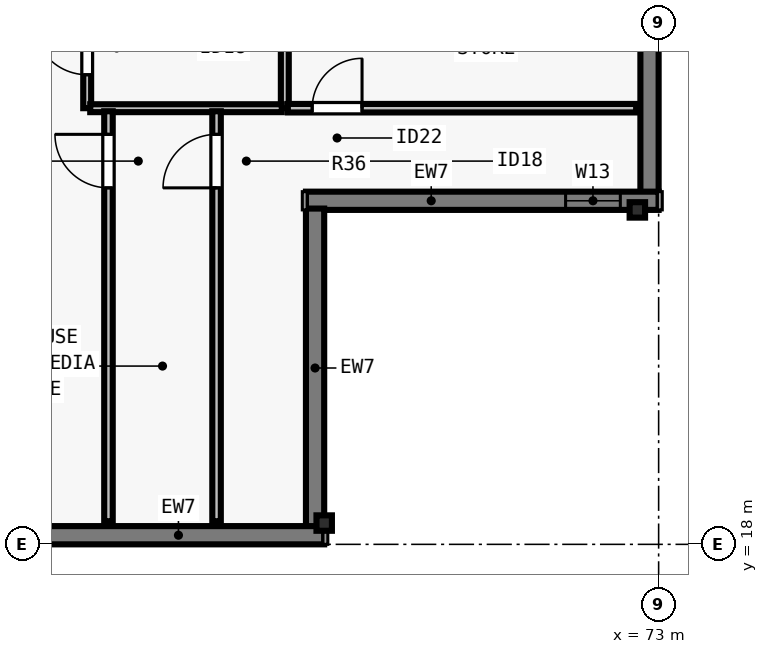
"""IFC4 building model, lengths in metres.
Left out: names, types, materials, properties, quantities, classifications, styles, units other than length and angle.
Written with IfcOpenShell. Run it as: python <this file> out.ifc"""

import sys

from ifc_helpers import new_model, si_unit, direction, frame, frame_2d, origin, origin_2d, place, context, subcontext, project, spatial, rectangle, i_section, extrude, element, fill, save


model = new_model("IFC4")
c1 = context("Model", 3, precision=1e-05, world=origin(), true_north=direction((0.0, 1.0)))
c2 = subcontext(c1, "Body", "Model", "MODEL_VIEW")
j1 = project(units=[si_unit("LENGTHUNIT", "METRE"), si_unit("PLANEANGLEUNIT", "RADIAN")], contexts=[c1])
p1 = place(None, origin())
s1 = spatial("IfcSite", under=j1, at=p1, CompositionType="ELEMENT")
p2 = place(p1, origin())
s2 = spatial("IfcBuilding", under=s1, at=p2, CompositionType="ELEMENT")
p3 = place(p2, frame((0.0, 0.0, 312.0)))
s3 = spatial("IfcBuildingStorey", under=s2, at=p3, CompositionType="ELEMENT", Elevation=312.0)
for number, where, z_axis, x_axis in (
    (1, (67.5, 18.35, 0.0), (0.0, 0.0, 1.0), (1.0, 0.0, 0.0)),
    (2, (72.65, 23.5, 0.0), (0.0, 0.0, 1.0), (0.0, 1.0, 0.0)),
):
    element("IfcColumn", number, at=place(p3, frame(where, z_axis=z_axis, x_axis=x_axis)), inside=s3, PredefinedType="COLUMN", context=c2, shape_type="SweptSolid", body=[
        extrude(i_section(OverallWidth=0.254, OverallDepth=0.254, WebThickness=0.009, FlangeThickness=0.014, FilletRadius=0.013, at=origin_2d()), origin(), (0.0, 0.0, 1.0), 3.5),
    ])
p4 = place(p3, frame((72.85, 44.4, 0.0), z_axis=(0.0, 0.0, 1.0), x_axis=(0.0, -1.0, 0.0)))
e3 = element("IfcWall", 3, at=p4, inside=s3, PredefinedType="SOLIDWALL", context=c2, shape_type="SweptSolid", body=[
    extrude(rectangle(XDim=20.622, YDim=0.3, at=frame_2d((10.311, 0.0))), origin(), (0.0, 0.0, 1.0), 3.29),
])
p5 = place(p4, frame((2.815, 0.0, 0.8)))
e4 = element("IfcOpeningElement", 4, at=p5, cuts=e3, PredefinedType="OPENING", context=c2, shape_type="SweptSolid", body=[
    extrude(rectangle(XDim=1.65, YDim=1.758, at=frame_2d((0.825, 0.879))), frame((0.0, 0.16, 0.0), z_axis=(0.0, -1.0, 0.0), x_axis=(1.0, 0.0, 0.0)), (0.0, 0.0, 1.0), 0.32),
])
p6 = place(p4, frame((6.071, 0.0, 0.8)))
e5 = element("IfcOpeningElement", 5, at=p6, cuts=e3, PredefinedType="OPENING", context=c2, shape_type="SweptSolid", body=[
    extrude(rectangle(XDim=2.0, YDim=1.758, at=frame_2d((1.0, 0.879))), frame((0.0, 0.16, 0.0), z_axis=(0.0, -1.0, 0.0), x_axis=(1.0, 0.0, 0.0)), (0.0, 0.0, 1.0), 0.32),
])
p7 = place(p4, frame((11.376, 0.0, 0.8)))
e6 = element("IfcOpeningElement", 6, at=p7, cuts=e3, PredefinedType="OPENING", context=c2, shape_type="SweptSolid", body=[
    extrude(rectangle(XDim=1.65, YDim=1.758, at=frame_2d((0.825, 0.879))), frame((0.0, 0.16, 0.0), z_axis=(0.0, -1.0, 0.0), x_axis=(1.0, 0.0, 0.0)), (0.0, 0.0, 1.0), 0.32),
])
p8 = place(p3, frame((73.0, 23.65, 0.0), z_axis=(0.0, 0.0, 1.0), x_axis=(-1.0, 0.0, 0.0)))
e7 = element("IfcWall", 7, at=p8, inside=s3, PredefinedType="SOLIDWALL", context=c2, shape_type="SweptSolid", body=[
    extrude(rectangle(XDim=5.8, YDim=0.3, at=frame_2d((2.9, 0.0))), origin(), (0.0, 0.0, 1.0), 3.29),
])
p9 = place(p8, frame((0.63, 0.0, 0.8)))
e8 = element("IfcOpeningElement", 8, at=p9, cuts=e7, PredefinedType="OPENING", context=c2, shape_type="SweptSolid", body=[
    extrude(rectangle(XDim=0.9, YDim=1.75, at=frame_2d((0.45, 0.875))), frame((0.0, 0.16, 0.0), z_axis=(0.0, -1.0, 0.0), x_axis=(1.0, 0.0, 0.0)), (0.0, 0.0, 1.0), 0.32),
])
p10 = place(p3, frame((67.35, 23.522, 0.0), z_axis=(0.0, 0.0, 1.0), x_axis=(0.0, -1.0, 0.0)))
e9 = element("IfcWall", 9, at=p10, inside=s3, PredefinedType="SOLIDWALL", context=c2, shape_type="SweptSolid", body=[
    extrude(rectangle(XDim=5.244, YDim=0.3, at=frame_2d((2.622, 0.0))), origin(), (0.0, 0.0, 1.0), 3.29),
])
p11 = place(p3, frame((67.5, 18.15, 0.0), z_axis=(0.0, 0.0, 1.0), x_axis=(-1.0, 0.0, 0.0)))
e10 = element("IfcWall", 10, at=p11, inside=s3, PredefinedType="SOLIDWALL", context=c2, shape_type="SweptSolid", body=[
    extrude(rectangle(XDim=30.722, YDim=0.3, at=frame_2d((15.361, 0.0))), origin(), (0.0, 0.0, 1.0), 3.29),
])
p12 = place(p11, frame((4.944, 0.0, 0.8)))
e11 = element("IfcOpeningElement", 11, at=p12, cuts=e10, PredefinedType="OPENING", context=c2, shape_type="SweptSolid", body=[
    extrude(rectangle(XDim=1.65, YDim=1.758, at=frame_2d((0.825, 0.879))), frame((0.0, 0.16, 0.0), z_axis=(0.0, -1.0, 0.0), x_axis=(1.0, 0.0, 0.0)), (0.0, 0.0, 1.0), 0.32),
])
p13 = place(p11, frame((7.756, 0.0, 0.8)))
e12 = element("IfcOpeningElement", 12, at=p13, cuts=e10, PredefinedType="OPENING", context=c2, shape_type="SweptSolid", body=[
    extrude(rectangle(XDim=2.0, YDim=1.758, at=frame_2d((1.0, 0.879))), frame((0.0, 0.16, 0.0), z_axis=(0.0, -1.0, 0.0), x_axis=(1.0, 0.0, 0.0)), (0.0, 0.0, 1.0), 0.32),
])
p14 = place(p11, frame((12.617, 0.0, 0.8)))
e13 = element("IfcOpeningElement", 13, at=p14, cuts=e10, PredefinedType="OPENING", context=c2, shape_type="SweptSolid", body=[
    extrude(rectangle(XDim=1.65, YDim=1.758, at=frame_2d((0.825, 0.879))), frame((0.0, 0.16, 0.0), z_axis=(0.0, -1.0, 0.0), x_axis=(1.0, 0.0, 0.0)), (0.0, 0.0, 1.0), 0.32),
])
p15 = place(p11, frame((16.28, 0.0, 0.8)))
e14 = element("IfcOpeningElement", 14, at=p15, cuts=e10, PredefinedType="OPENING", context=c2, shape_type="SweptSolid", body=[
    extrude(rectangle(XDim=2.0, YDim=1.758, at=frame_2d((1.0, 0.879))), frame((0.0, 0.16, 0.0), z_axis=(0.0, -1.0, 0.0), x_axis=(1.0, 0.0, 0.0)), (0.0, 0.0, 1.0), 0.32),
])
p16 = place(p11, frame((21.142, 0.0, 0.8)))
e15 = element("IfcOpeningElement", 15, at=p16, cuts=e10, PredefinedType="OPENING", context=c2, shape_type="SweptSolid", body=[
    extrude(rectangle(XDim=1.65, YDim=1.758, at=frame_2d((0.825, 0.879))), frame((0.0, 0.16, 0.0), z_axis=(0.0, -1.0, 0.0), x_axis=(1.0, 0.0, 0.0)), (0.0, 0.0, 1.0), 0.32),
])
p17 = place(p11, frame((23.954, 0.0, 0.8)))
e16 = element("IfcOpeningElement", 16, at=p17, cuts=e10, PredefinedType="OPENING", context=c2, shape_type="SweptSolid", body=[
    extrude(rectangle(XDim=2.0, YDim=1.758, at=frame_2d((1.0, 0.879))), frame((0.0, 0.16, 0.0), z_axis=(0.0, -1.0, 0.0), x_axis=(1.0, 0.0, 0.0)), (0.0, 0.0, 1.0), 0.32),
])
p18 = place(p3, frame((66.853, 25.173, 0.0), z_axis=(0.0, 0.0, 1.0), x_axis=(0.0, 1.0, 0.0)))
e17 = element("IfcWall", 17, at=p18, inside=s3, PredefinedType="PLUMBINGWALL", context=c2, shape_type="SweptSolid", body=[
    extrude(rectangle(XDim=2.75, YDim=0.13, at=frame_2d((1.375, 0.0))), origin(), (0.0, 0.0, 1.0), 3.29),
])
p19 = place(p3, frame((63.603, 25.173, 0.0), z_axis=(0.0, 0.0, 1.0), x_axis=(0.0, 1.0, 0.0)))
e18 = element("IfcWall", 18, at=p19, inside=s3, PredefinedType="PLUMBINGWALL", context=c2, shape_type="SweptSolid", body=[
    extrude(rectangle(XDim=2.75, YDim=0.13, at=frame_2d((1.375, 0.0))), origin(), (0.0, 0.0, 1.0), 3.29),
])
p20 = place(p19, frame((0.55, 0.0, 0.0)))
e19 = element("IfcOpeningElement", 19, at=p20, cuts=e18, PredefinedType="OPENING", context=c2, shape_type="SweptSolid", body=[
    extrude(rectangle(XDim=0.88, YDim=2.1, at=frame_2d((0.44, 1.05))), frame((0.0, 0.075, 0.0), z_axis=(0.0, -1.0, 0.0), x_axis=(1.0, 0.0, 0.0)), (0.0, 0.0, 1.0), 0.15),
])
p21 = place(p3, frame((63.653, 25.173, 0.0), z_axis=(0.0, 0.0, 1.0), x_axis=(1.0, 0.0, 0.0)))
e20 = element("IfcWall", 20, at=p21, inside=s3, PredefinedType="PLUMBINGWALL", context=c2, shape_type="SweptSolid", body=[
    extrude(rectangle(XDim=3.15, YDim=0.13, at=frame_2d((1.575, 0.0))), origin(), (0.0, 0.0, 1.0), 3.29),
])
p22 = place(p3, frame((65.73, 18.38, 0.0), z_axis=(0.0, 0.0, 1.0), x_axis=(0.0, 1.0, 0.0)))
e21 = element("IfcWall", 21, at=p22, inside=s3, PredefinedType="PARTITIONING", context=c2, shape_type="SweptSolid", body=[
    extrude(rectangle(XDim=6.743, YDim=0.14, at=frame_2d((3.371, 0.0))), origin(), (0.0, 0.0, 1.0), 2.653),
])
p23 = place(p22, frame((5.482, 0.0, 0.0)))
e22 = element("IfcOpeningElement", 22, at=p23, cuts=e21, PredefinedType="OPENING", context=c2, shape_type="SweptSolid", body=[
    extrude(rectangle(XDim=0.88, YDim=2.1, at=frame_2d((0.44, 1.05))), frame((0.0, 0.08, 0.0), z_axis=(0.0, -1.0, 0.0), x_axis=(1.0, 0.0, 0.0)), (0.0, 0.0, 1.0), 0.16),
])
p24 = place(p3, frame((66.903, 25.173, 0.0), z_axis=(0.0, 0.0, 1.0), x_axis=(1.0, 0.0, 0.0)))
e23 = element("IfcWall", 23, at=p24, inside=s3, PredefinedType="PARTITIONING", context=c2, shape_type="SweptSolid", body=[
    extrude(rectangle(XDim=5.727, YDim=0.14, at=frame_2d((2.864, 0.0))), origin(), (0.0, 0.0, 1.0), 3.009),
])
p25 = place(p24, frame((0.4, 0.0, 0.0)))
e24 = element("IfcOpeningElement", 24, at=p25, cuts=e23, PredefinedType="OPENING", context=c2, shape_type="SweptSolid", body=[
    extrude(rectangle(XDim=0.82, YDim=2.1, at=frame_2d((0.41, 1.05))), frame((0.0, 0.08, 0.0), z_axis=(0.0, -1.0, 0.0), x_axis=(1.0, 0.0, 0.0)), (0.0, 0.0, 1.0), 0.16),
])
p26 = place(p3, frame((63.952, 18.38, 0.0), z_axis=(0.0, 0.0, 1.0), x_axis=(0.0, 1.0, 0.0)))
e25 = element("IfcWall", 25, at=p26, inside=s3, PredefinedType="PARTITIONING", context=c2, shape_type="SweptSolid", body=[
    extrude(rectangle(XDim=6.743, YDim=0.14, at=frame_2d((3.371, 0.0))), origin(), (0.0, 0.0, 1.0), 2.653),
])
p27 = place(p26, frame((5.482, 0.0, 0.0)))
e26 = element("IfcOpeningElement", 26, at=p27, cuts=e25, PredefinedType="OPENING", context=c2, shape_type="SweptSolid", body=[
    extrude(rectangle(XDim=0.88, YDim=2.1, at=frame_2d((0.44, 1.05))), frame((0.0, 0.08, 0.0), z_axis=(0.0, -1.0, 0.0), x_axis=(1.0, 0.0, 0.0)), (0.0, 0.0, 1.0), 0.16),
])
p28 = place(p9, origin())
e27 = element("IfcWindow", 27, at=p28, inside=s3, PartitioningType="SINGLE_PANEL", PredefinedType="WINDOW", context=c2, shape_type="SweptSolid", body=[
    extrude(rectangle(XDim=0.9, YDim=1.75, at=frame_2d((0.45, 0.875))), frame((0.0, -0.04, 0.0), z_axis=(0.0, -1.0, 0.0), x_axis=(1.0, 0.0, 0.0)), (0.0, 0.0, 1.0), 0.06),
])
fill(e8, e27)
p29 = place(p20, origin())
e28 = element("IfcDoor", 28, at=p29, inside=s3, OperationType="SINGLE_SWING_RIGHT", PredefinedType="DOOR", context=c2, shape_type="SweptSolid", body=[
    extrude(rectangle(XDim=0.88, YDim=2.1, at=frame_2d((0.44, 1.05))), frame((0.0, 0.025, 0.0), z_axis=(0.0, -1.0, 0.0), x_axis=(1.0, 0.0, 0.0)), (0.0, 0.0, 1.0), 0.05),
])
fill(e19, e28)
p30 = place(p25, origin())
e29 = element("IfcDoor", 29, at=p30, inside=s3, OperationType="SINGLE_SWING_RIGHT", PredefinedType="DOOR", context=c2, shape_type="SweptSolid", body=[
    extrude(rectangle(XDim=0.82, YDim=2.1, at=frame_2d((0.41, 1.05))), frame((0.0, 0.025, 0.0), z_axis=(0.0, -1.0, 0.0), x_axis=(1.0, 0.0, 0.0)), (0.0, 0.0, 1.0), 0.05),
])
fill(e24, e29)
p31 = place(p23, origin())
e30 = element("IfcDoor", 30, at=p31, inside=s3, OperationType="SINGLE_SWING_LEFT", PredefinedType="DOOR", context=c2, shape_type="SweptSolid", body=[
    extrude(rectangle(XDim=0.88, YDim=2.1, at=frame_2d((0.44, 1.05))), frame((0.0, 0.025, 0.0), z_axis=(0.0, -1.0, 0.0), x_axis=(1.0, 0.0, 0.0)), (0.0, 0.0, 1.0), 0.05),
])
fill(e22, e30)
p32 = place(p27, origin())
e31 = element("IfcDoor", 31, at=p32, inside=s3, OperationType="SINGLE_SWING_RIGHT", PredefinedType="DOOR", context=c2, shape_type="SweptSolid", body=[
    extrude(rectangle(XDim=0.88, YDim=2.1, at=frame_2d((0.44, 1.05))), frame((0.0, 0.025, 0.0), z_axis=(0.0, -1.0, 0.0), x_axis=(1.0, 0.0, 0.0)), (0.0, 0.0, 1.0), 0.05),
])
fill(e26, e31)
save(model, sys.argv[1])
